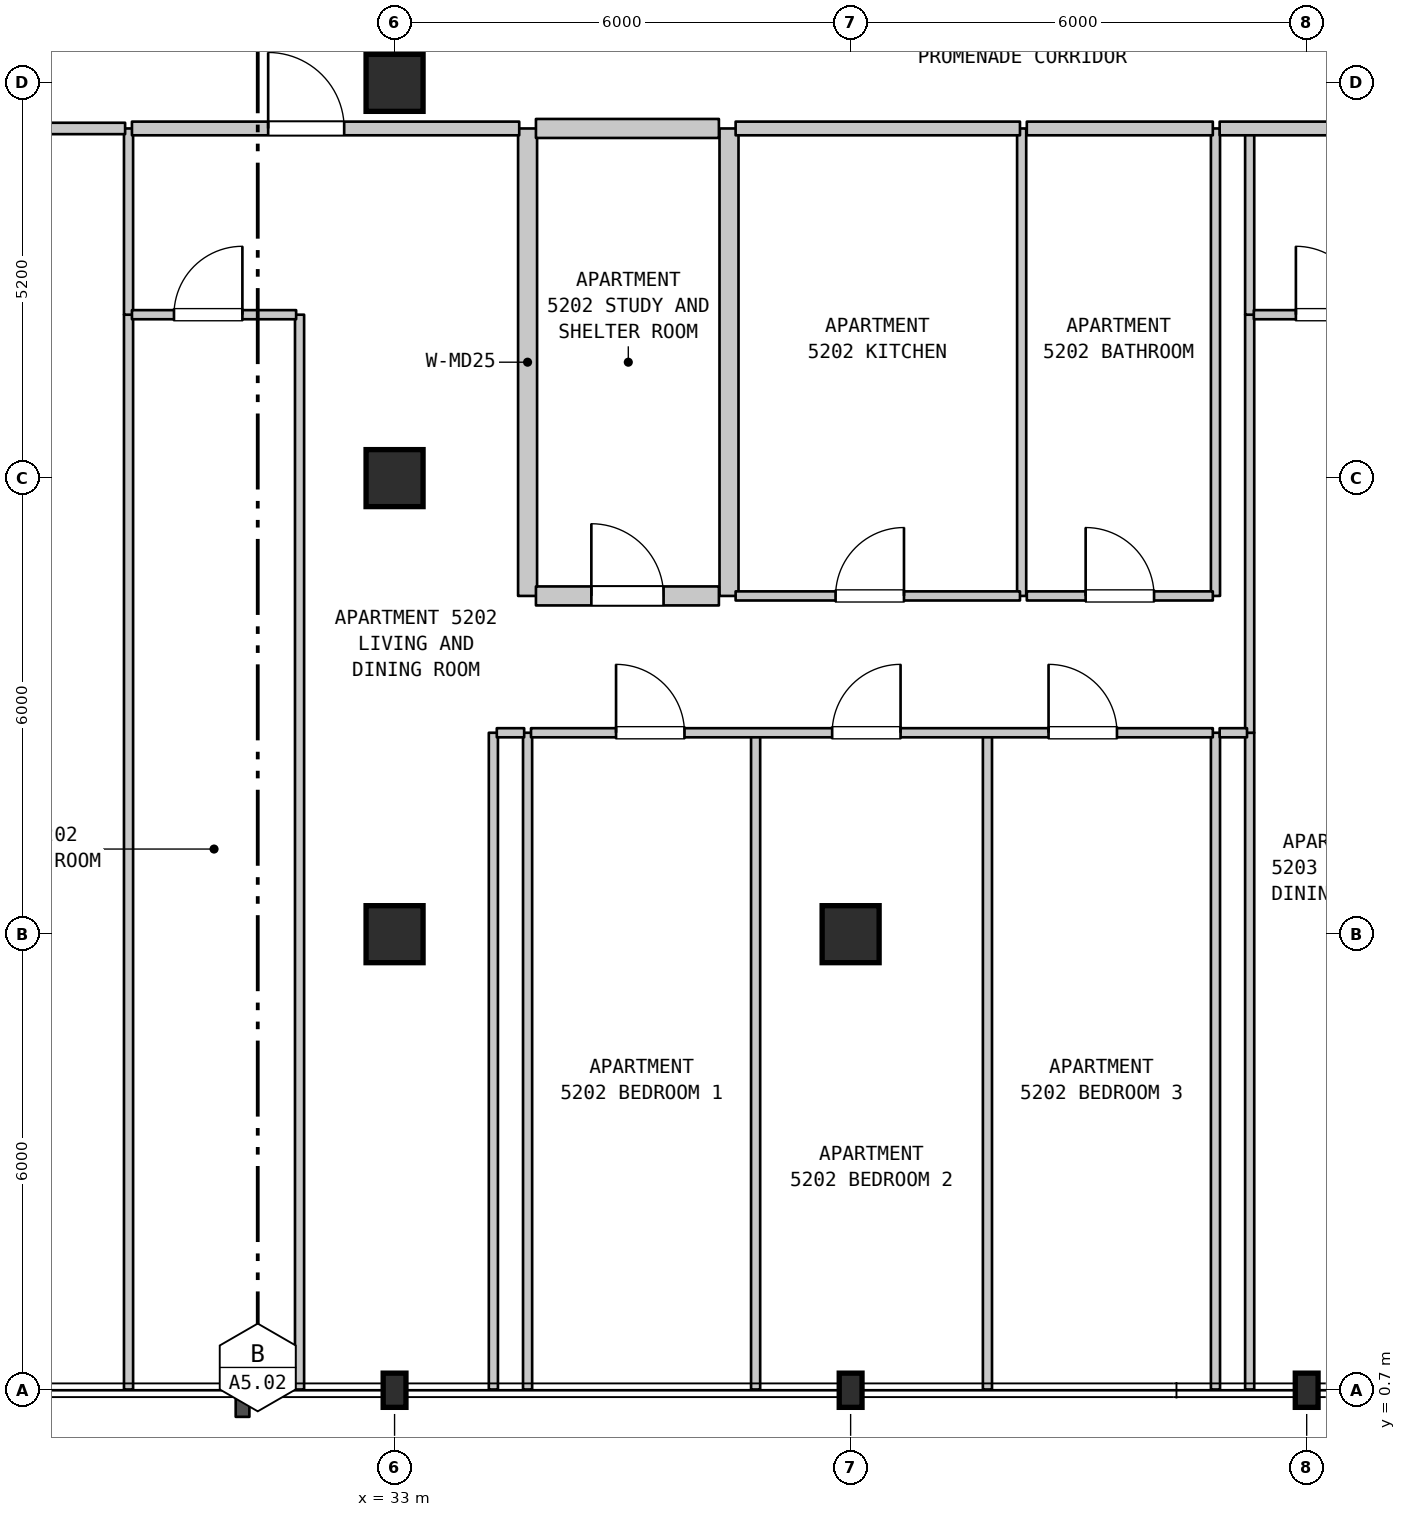
"""IFC4 building model, lengths in metres.
Left out: names, types, materials, properties, quantities, classifications, styles, units other than length and angle.
Written with IfcOpenShell. Run it as: python <this file> out.ifc"""

import sys

from ifc_helpers import new_model, si_unit, direction, frame, frame_2d, origin, origin_2d, place, context, subcontext, project, spatial, rectangle, i_section, extrude, element, fill, save


model = new_model("IFC4")
c1 = context("Model", 3, precision=1e-05, world=origin(), true_north=direction((0.0, 1.0)))
c2 = subcontext(c1, "Body", "Model", "MODEL_VIEW")
j1 = project(units=[si_unit("LENGTHUNIT", "METRE"), si_unit("PLANEANGLEUNIT", "RADIAN")], contexts=[c1])
p1 = place(None, origin())
s1 = spatial("IfcSite", under=j1, at=p1, CompositionType="ELEMENT")
p2 = place(p1, origin())
s2 = spatial("IfcBuilding", under=s1, at=p2, CompositionType="ELEMENT")
p3 = place(p2, frame((0.0, 0.0, 210.6)))
s3 = spatial("IfcBuildingStorey", under=s2, at=p3, CompositionType="ELEMENT", Elevation=210.6)
p4 = place(p3, frame((33.0, 0.7, 0.0), z_axis=(0.0, 0.0, 1.0), x_axis=(1.0, 0.0, 0.0)))
e1 = element("IfcColumn", 1, at=p4, inside=s3, PredefinedType="COLUMN", context=c2, shape_type="SweptSolid", body=[
    extrude(i_section(OverallWidth=0.3, OverallDepth=0.45, WebThickness=0.014, FlangeThickness=0.026, FilletRadius=0.027, at=origin_2d()), origin(), (0.0, 0.0, 1.0), 3.7),
])
for number, where, z_axis, x_axis in (
    (2, (33.0, 6.7, 0.0), (0.0, 0.0, 1.0), (1.0, 0.0, 0.0)),
    (3, (33.0, 12.7, 0.0), (0.0, 0.0, 1.0), (1.0, 0.0, 0.0)),
    (4, (33.0, 17.9, 0.0), (0.0, 0.0, 1.0), (1.0, 0.0, 0.0)),
):
    element("IfcColumn", number, at=place(p3, frame(where, z_axis=z_axis, x_axis=x_axis)), inside=s3, PredefinedType="COLUMN", context=c2, shape_type="SweptSolid", body=[
        extrude(rectangle(XDim=0.75, YDim=0.75, at=origin_2d()), origin(), (0.0, 0.0, 1.0), 3.7),
    ])
p5 = place(p3, frame((39.0, 0.7, 0.0), z_axis=(0.0, 0.0, 1.0), x_axis=(1.0, 0.0, 0.0)))
e5 = element("IfcColumn", 5, at=p5, inside=s3, PredefinedType="COLUMN", context=c2, shape_type="SweptSolid", body=[
    extrude(i_section(OverallWidth=0.3, OverallDepth=0.45, WebThickness=0.014, FlangeThickness=0.026, FilletRadius=0.027, at=origin_2d()), origin(), (0.0, 0.0, 1.0), 3.7),
])
p6 = place(p3, frame((39.0, 6.7, 0.0), z_axis=(0.0, 0.0, 1.0), x_axis=(1.0, 0.0, 0.0)))
e6 = element("IfcColumn", 6, at=p6, inside=s3, PredefinedType="COLUMN", context=c2, shape_type="SweptSolid", body=[
    extrude(rectangle(XDim=0.75, YDim=0.75, at=origin_2d()), origin(), (0.0, 0.0, 1.0), 3.7),
])
p7 = place(p3, frame((45.0, 0.7, 0.0), z_axis=(0.0, 0.0, 1.0), x_axis=(1.0, 0.0, 0.0)))
e7 = element("IfcColumn", 7, at=p7, inside=s3, PredefinedType="COLUMN", context=c2, shape_type="SweptSolid", body=[
    extrude(i_section(OverallWidth=0.3, OverallDepth=0.45, WebThickness=0.014, FlangeThickness=0.026, FilletRadius=0.027, at=origin_2d()), origin(), (0.0, 0.0, 1.0), 3.7),
])
p8 = place(p3, frame((29.5, 0.71, 0.0), z_axis=(0.0, 0.0, 1.0), x_axis=(0.0, 1.0, 0.0)))
e8 = element("IfcWall", 8, at=p8, inside=s3, PredefinedType="PARTITIONING", context=c2, shape_type="SweptSolid", body=[
    extrude(rectangle(XDim=14.14, YDim=0.12, at=frame_2d((7.07, 0.0))), origin(), (0.0, 0.0, 1.0), 3.39),
])
p9 = place(p3, frame((29.5, 14.85, 0.0), z_axis=(0.0, 0.0, 1.0), x_axis=(0.0, 1.0, 0.0)))
e9 = element("IfcWall", 9, at=p9, inside=s3, PredefinedType="PARTITIONING", context=c2, shape_type="SweptSolid", body=[
    extrude(rectangle(XDim=2.45, YDim=0.12, at=frame_2d((1.225, 0.0))), origin(), (0.0, 0.0, 1.0), 3.39),
])
p10 = place(p3, frame((31.75, 0.71, 0.0), z_axis=(0.0, 0.0, 1.0), x_axis=(0.0, 1.0, 0.0)))
e10 = element("IfcWall", 10, at=p10, inside=s3, PredefinedType="PARTITIONING", context=c2, shape_type="SweptSolid", body=[
    extrude(rectangle(XDim=14.14, YDim=0.12, at=frame_2d((7.07, 0.0))), origin(), (0.0, 0.0, 1.0), 3.39),
])
for number, where, z_axis, x_axis in (
    (11, (34.3, 0.71, 0.0), (0.0, 0.0, 1.0), (0.0, 1.0, 0.0)),
    (12, (34.75, 0.71, 0.0), (0.0, 0.0, 1.0), (0.0, 1.0, 0.0)),
):
    element("IfcWall", number, at=place(p3, frame(where, z_axis=z_axis, x_axis=x_axis)), inside=s3, PredefinedType="PARTITIONING", context=c2, shape_type="SweptSolid", body=[
        extrude(rectangle(XDim=8.64, YDim=0.12, at=frame_2d((4.32, 0.0))), origin(), (0.0, 0.0, 1.0), 3.39),
    ])
for number, where, z_axis, x_axis in (
    (13, (34.75, 11.15, 0.0), (0.0, 0.0, 1.0), (0.0, 1.0, 0.0)),
    (14, (37.4, 11.15, 0.0), (0.0, 0.0, 1.0), (0.0, 1.0, 0.0)),
):
    element("IfcWall", number, at=place(p3, frame(where, z_axis=z_axis, x_axis=x_axis)), inside=s3, PredefinedType="STANDARD", context=c2, shape_type="SweptSolid", body=[
        extrude(rectangle(XDim=6.15, YDim=0.25, at=frame_2d((3.075, 0.0))), origin(), (0.0, 0.0, 1.0), 3.39),
    ])
for number, where, z_axis, x_axis in (
    (15, (37.75, 0.71, 0.0), (0.0, 0.0, 1.0), (0.0, 1.0, 0.0)),
    (16, (40.8, 0.71, 0.0), (0.0, 0.0, 1.0), (0.0, 1.0, 0.0)),
):
    element("IfcWall", number, at=place(p3, frame(where, z_axis=z_axis, x_axis=x_axis)), inside=s3, PredefinedType="PARTITIONING", context=c2, shape_type="SweptSolid", body=[
        extrude(rectangle(XDim=8.64, YDim=0.12, at=frame_2d((4.32, 0.0))), origin(), (0.0, 0.0, 1.0), 3.39),
    ])
p11 = place(p3, frame((41.25, 11.15, 0.0), z_axis=(0.0, 0.0, 1.0), x_axis=(0.0, 1.0, 0.0)))
e17 = element("IfcWall", 17, at=p11, inside=s3, PredefinedType="PARTITIONING", context=c2, shape_type="SweptSolid", body=[
    extrude(rectangle(XDim=6.15, YDim=0.12, at=frame_2d((3.075, 0.0))), origin(), (0.0, 0.0, 1.0), 3.39),
])
p12 = place(p3, frame((43.8, 0.71, 0.0), z_axis=(0.0, 0.0, 1.0), x_axis=(0.0, 1.0, 0.0)))
e18 = element("IfcWall", 18, at=p12, inside=s3, PredefinedType="PARTITIONING", context=c2, shape_type="SweptSolid", body=[
    extrude(rectangle(XDim=8.64, YDim=0.12, at=frame_2d((4.32, 0.0))), origin(), (0.0, 0.0, 1.0), 3.39),
])
p13 = place(p3, frame((43.8, 11.15, 0.0), z_axis=(0.0, 0.0, 1.0), x_axis=(0.0, 1.0, 0.0)))
e19 = element("IfcWall", 19, at=p13, inside=s3, PredefinedType="PARTITIONING", context=c2, shape_type="SweptSolid", body=[
    extrude(rectangle(XDim=6.15, YDim=0.12, at=frame_2d((3.075, 0.0))), origin(), (0.0, 0.0, 1.0), 3.39),
])
p14 = place(p3, frame((44.25, 0.71, 0.0), z_axis=(0.0, 0.0, 1.0), x_axis=(0.0, 1.0, 0.0)))
e20 = element("IfcWall", 20, at=p14, inside=s3, PredefinedType="PARTITIONING", context=c2, shape_type="SweptSolid", body=[
    extrude(rectangle(XDim=8.64, YDim=0.12, at=frame_2d((4.32, 0.0))), origin(), (0.0, 0.0, 1.0), 3.39),
])
p15 = place(p3, frame((44.25, 9.35, 0.0), z_axis=(0.0, 0.0, 1.0), x_axis=(0.0, 1.0, 0.0)))
e21 = element("IfcWall", 21, at=p15, inside=s3, PredefinedType="PARTITIONING", context=c2, shape_type="SweptSolid", body=[
    extrude(rectangle(XDim=5.5, YDim=0.12, at=frame_2d((2.75, 0.0))), origin(), (0.0, 0.0, 1.0), 3.39),
])
p16 = place(p3, frame((44.25, 14.85, 0.0), z_axis=(0.0, 0.0, 1.0), x_axis=(0.0, 1.0, 0.0)))
e22 = element("IfcWall", 22, at=p16, inside=s3, PredefinedType="PARTITIONING", context=c2, shape_type="SweptSolid", body=[
    extrude(rectangle(XDim=2.45, YDim=0.12, at=frame_2d((1.225, 0.0))), origin(), (0.0, 0.0, 1.0), 3.39),
])
p17 = place(p3, frame((34.345, 9.35, 0.0), z_axis=(0.0, 0.0, 1.0), x_axis=(1.0, 0.0, 0.0)))
e23 = element("IfcWall", 23, at=p17, inside=s3, PredefinedType="PARTITIONING", context=c2, shape_type="SweptSolid", body=[
    extrude(rectangle(XDim=0.36, YDim=0.12, at=frame_2d((0.18, 0.0))), origin(), (0.0, 0.0, 1.0), 3.39),
])
p18 = place(p3, frame((34.795, 9.35, 0.0), z_axis=(0.0, 0.0, 1.0), x_axis=(1.0, 0.0, 0.0)))
e24 = element("IfcWall", 24, at=p18, inside=s3, PredefinedType="PARTITIONING", context=c2, shape_type="SweptSolid", body=[
    extrude(rectangle(XDim=8.97, YDim=0.12, at=frame_2d((4.485, 0.0))), origin(), (0.0, 0.0, 1.0), 3.39),
])
p19 = place(p18, frame((1.119, 0.0, 0.0)))
e25 = element("IfcOpeningElement", 25, at=p19, cuts=e24, PredefinedType="OPENING", context=c2, shape_type="SweptSolid", body=[
    extrude(rectangle(XDim=0.9, YDim=2.15, at=frame_2d((0.45, 1.075))), frame((0.0, 0.07, 0.0), z_axis=(0.0, -1.0, 0.0), x_axis=(1.0, 0.0, 0.0)), (0.0, 0.0, 1.0), 0.14),
])
p20 = place(p18, frame((3.962, 0.0, 0.0)))
e26 = element("IfcOpeningElement", 26, at=p20, cuts=e24, PredefinedType="OPENING", context=c2, shape_type="SweptSolid", body=[
    extrude(rectangle(XDim=0.9, YDim=2.15, at=frame_2d((0.45, 1.075))), frame((0.0, 0.07, 0.0), z_axis=(0.0, -1.0, 0.0), x_axis=(1.0, 0.0, 0.0)), (0.0, 0.0, 1.0), 0.14),
])
p21 = place(p18, frame((6.809, 0.0, 0.0)))
e27 = element("IfcOpeningElement", 27, at=p21, cuts=e24, PredefinedType="OPENING", context=c2, shape_type="SweptSolid", body=[
    extrude(rectangle(XDim=0.9, YDim=2.15, at=frame_2d((0.45, 1.075))), frame((0.0, 0.07, 0.0), z_axis=(0.0, -1.0, 0.0), x_axis=(1.0, 0.0, 0.0)), (0.0, 0.0, 1.0), 0.14),
])
p22 = place(p3, frame((43.855, 9.35, 0.0), z_axis=(0.0, 0.0, 1.0), x_axis=(1.0, 0.0, 0.0)))
e28 = element("IfcWall", 28, at=p22, inside=s3, PredefinedType="PARTITIONING", context=c2, shape_type="SweptSolid", body=[
    extrude(rectangle(XDim=0.36, YDim=0.12, at=frame_2d((0.18, 0.0))), origin(), (0.0, 0.0, 1.0), 3.39),
])
p23 = place(p3, frame((34.86, 11.15, 0.0), z_axis=(0.0, 0.0, 1.0), x_axis=(1.0, 0.0, 0.0)))
e29 = element("IfcWall", 29, at=p23, inside=s3, PredefinedType="STANDARD", context=c2, shape_type="SweptSolid", body=[
    extrude(rectangle(XDim=2.407, YDim=0.25, at=frame_2d((1.204, 0.0))), origin(), (0.0, 0.0, 1.0), 3.39),
])
p24 = place(p23, frame((0.729, 0.0, 0.0)))
e30 = element("IfcOpeningElement", 30, at=p24, cuts=e29, PredefinedType="OPENING", context=c2, shape_type="SweptSolid", body=[
    extrude(rectangle(XDim=0.95, YDim=2.15, at=frame_2d((0.475, 1.075))), frame((0.0, 0.135, 0.0), z_axis=(0.0, -1.0, 0.0), x_axis=(1.0, 0.0, 0.0)), (0.0, 0.0, 1.0), 0.27),
])
p25 = place(p3, frame((37.487, 11.15, 0.0), z_axis=(0.0, 0.0, 1.0), x_axis=(1.0, 0.0, 0.0)))
e31 = element("IfcWall", 31, at=p25, inside=s3, PredefinedType="PARTITIONING", context=c2, shape_type="SweptSolid", body=[
    extrude(rectangle(XDim=3.741, YDim=0.12, at=frame_2d((1.871, 0.0))), origin(), (0.0, 0.0, 1.0), 3.39),
])
p26 = place(p25, frame((1.315, 0.0, 0.0)))
e32 = element("IfcOpeningElement", 32, at=p26, cuts=e31, PredefinedType="OPENING", context=c2, shape_type="SweptSolid", body=[
    extrude(rectangle(XDim=0.9, YDim=2.15, at=frame_2d((0.45, 1.075))), frame((0.0, 0.07, 0.0), z_axis=(0.0, -1.0, 0.0), x_axis=(1.0, 0.0, 0.0)), (0.0, 0.0, 1.0), 0.14),
])
p27 = place(p3, frame((41.318, 11.15, 0.0), z_axis=(0.0, 0.0, 1.0), x_axis=(1.0, 0.0, 0.0)))
e33 = element("IfcWall", 33, at=p27, inside=s3, PredefinedType="PARTITIONING", context=c2, shape_type="SweptSolid", body=[
    extrude(rectangle(XDim=2.447, YDim=0.12, at=frame_2d((1.223, 0.0))), origin(), (0.0, 0.0, 1.0), 3.39),
])
p28 = place(p27, frame((0.774, 0.0, 0.0)))
e34 = element("IfcOpeningElement", 34, at=p28, cuts=e33, PredefinedType="OPENING", context=c2, shape_type="SweptSolid", body=[
    extrude(rectangle(XDim=0.9, YDim=2.1, at=frame_2d((0.45, 1.05))), frame((0.0, 0.07, 0.0), z_axis=(0.0, -1.0, 0.0), x_axis=(1.0, 0.0, 0.0)), (0.0, 0.0, 1.0), 0.14),
])
p29 = place(p3, frame((29.545, 14.85, 0.0), z_axis=(0.0, 0.0, 1.0), x_axis=(1.0, 0.0, 0.0)))
e35 = element("IfcWall", 35, at=p29, inside=s3, PredefinedType="PARTITIONING", context=c2, shape_type="SweptSolid", body=[
    extrude(rectangle(XDim=2.16, YDim=0.12, at=frame_2d((1.08, 0.0))), origin(), (0.0, 0.0, 1.0), 3.39),
])
p30 = place(p29, frame((0.553, 0.0, 0.0)))
e36 = element("IfcOpeningElement", 36, at=p30, cuts=e35, PredefinedType="OPENING", context=c2, shape_type="SweptSolid", body=[
    extrude(rectangle(XDim=0.9, YDim=2.15, at=frame_2d((0.45, 1.075))), frame((0.0, 0.07, 0.0), z_axis=(0.0, -1.0, 0.0), x_axis=(1.0, 0.0, 0.0)), (0.0, 0.0, 1.0), 0.14),
])
p31 = place(p3, frame((44.305, 14.85, 0.0), z_axis=(0.0, 0.0, 1.0), x_axis=(1.0, 0.0, 0.0)))
e37 = element("IfcWall", 37, at=p31, inside=s3, PredefinedType="PARTITIONING", context=c2, shape_type="SweptSolid", body=[
    extrude(rectangle(XDim=2.16, YDim=0.12, at=frame_2d((1.08, 0.0))), origin(), (0.0, 0.0, 1.0), 3.39),
])
p32 = place(p31, frame((0.553, 0.0, 0.0)))
e38 = element("IfcOpeningElement", 38, at=p32, cuts=e37, PredefinedType="OPENING", context=c2, shape_type="SweptSolid", body=[
    extrude(rectangle(XDim=0.9, YDim=2.15, at=frame_2d((0.45, 1.075))), frame((0.0, 0.07, 0.0), z_axis=(0.0, -1.0, 0.0), x_axis=(1.0, 0.0, 0.0)), (0.0, 0.0, 1.0), 0.14),
])
p33 = place(p3, frame((24.845, 17.3, 0.0), z_axis=(0.0, 0.0, 1.0), x_axis=(1.0, 0.0, 0.0)))
e39 = element("IfcWall", 39, at=p33, inside=s3, PredefinedType="STANDARD", context=c2, shape_type="SweptSolid", body=[
    extrude(rectangle(XDim=4.61, YDim=0.15, at=frame_2d((2.305, 0.0))), origin(), (0.0, 0.0, 1.0), 3.39),
])
p34 = place(p33, frame((1.734, 0.0, 0.0)))
e40 = element("IfcOpeningElement", 40, at=p34, cuts=e39, PredefinedType="OPENING", context=c2, shape_type="SweptSolid", body=[
    extrude(rectangle(XDim=1.0, YDim=2.15, at=frame_2d((0.5, 1.075))), frame((0.0, 0.085, 0.0), z_axis=(0.0, -1.0, 0.0), x_axis=(1.0, 0.0, 0.0)), (0.0, 0.0, 1.0), 0.17),
])
p35 = place(p3, frame((29.545, 17.3, 0.0), z_axis=(0.0, 0.0, 1.0), x_axis=(1.0, 0.0, 0.0)))
e41 = element("IfcWall", 41, at=p35, inside=s3, PredefinedType="STANDARD", context=c2, shape_type="SweptSolid", body=[
    extrude(rectangle(XDim=5.095, YDim=0.18, at=frame_2d((2.547, 0.0))), origin(), (0.0, 0.0, 1.0), 3.39),
])
p36 = place(p35, frame((1.792, 0.0, 0.0)))
e42 = element("IfcOpeningElement", 42, at=p36, cuts=e41, PredefinedType="OPENING", context=c2, shape_type="SweptSolid", body=[
    extrude(rectangle(XDim=1.0, YDim=2.15, at=frame_2d((0.5, 1.075))), frame((0.0, 0.1, 0.0), z_axis=(0.0, -1.0, 0.0), x_axis=(1.0, 0.0, 0.0)), (0.0, 0.0, 1.0), 0.2),
])
p37 = place(p3, frame((34.86, 17.3, 0.0), z_axis=(0.0, 0.0, 1.0), x_axis=(1.0, 0.0, 0.0)))
e43 = element("IfcWall", 43, at=p37, inside=s3, PredefinedType="STANDARD", context=c2, shape_type="SweptSolid", body=[
    extrude(rectangle(XDim=2.407, YDim=0.25, at=frame_2d((1.204, 0.0))), origin(), (0.0, 0.0, 1.0), 3.39),
])
p38 = place(p3, frame((37.487, 17.3, 0.0), z_axis=(0.0, 0.0, 1.0), x_axis=(1.0, 0.0, 0.0)))
e44 = element("IfcWall", 44, at=p38, inside=s3, PredefinedType="STANDARD", context=c2, shape_type="SweptSolid", body=[
    extrude(rectangle(XDim=3.741, YDim=0.18, at=frame_2d((1.871, 0.0))), origin(), (0.0, 0.0, 1.0), 3.39),
])
p39 = place(p3, frame((41.318, 17.3, 0.0), z_axis=(0.0, 0.0, 1.0), x_axis=(1.0, 0.0, 0.0)))
e45 = element("IfcWall", 45, at=p39, inside=s3, PredefinedType="STANDARD", context=c2, shape_type="SweptSolid", body=[
    extrude(rectangle(XDim=2.447, YDim=0.18, at=frame_2d((1.223, 0.0))), origin(), (0.0, 0.0, 1.0), 3.39),
])
p40 = place(p3, frame((43.855, 17.3, 0.0), z_axis=(0.0, 0.0, 1.0), x_axis=(1.0, 0.0, 0.0)))
e46 = element("IfcWall", 46, at=p40, inside=s3, PredefinedType="STANDARD", context=c2, shape_type="SweptSolid", body=[
    extrude(rectangle(XDim=5.21, YDim=0.18, at=frame_2d((2.605, 0.0))), origin(), (0.0, 0.0, 1.0), 3.39),
])
p41 = place(p40, frame((2.305, 0.0, 0.0)))
e47 = element("IfcOpeningElement", 47, at=p41, cuts=e46, PredefinedType="OPENING", context=c2, shape_type="SweptSolid", body=[
    extrude(rectangle(XDim=1.0, YDim=2.15, at=frame_2d((0.5, 1.075))), frame((0.0, 0.1, 0.0), z_axis=(0.0, -1.0, 0.0), x_axis=(1.0, 0.0, 0.0)), (0.0, 0.0, 1.0), 0.2),
])
p42 = place(p19, origin())
e48 = element("IfcDoor", 48, at=p42, inside=s3, OperationType="SINGLE_SWING_LEFT", PredefinedType="DOOR", context=c2, shape_type="SweptSolid", body=[
    extrude(rectangle(XDim=0.9, YDim=2.15, at=frame_2d((0.45, 1.075))), frame((0.0, 0.025, 0.0), z_axis=(0.0, -1.0, 0.0), x_axis=(1.0, 0.0, 0.0)), (0.0, 0.0, 1.0), 0.05),
])
fill(e25, e48)
p43 = place(p20, origin())
e49 = element("IfcDoor", 49, at=p43, inside=s3, OperationType="SINGLE_SWING_RIGHT", PredefinedType="DOOR", context=c2, shape_type="SweptSolid", body=[
    extrude(rectangle(XDim=0.9, YDim=2.15, at=frame_2d((0.45, 1.075))), frame((0.0, 0.025, 0.0), z_axis=(0.0, -1.0, 0.0), x_axis=(1.0, 0.0, 0.0)), (0.0, 0.0, 1.0), 0.05),
])
fill(e26, e49)
p44 = place(p21, origin())
e50 = element("IfcDoor", 50, at=p44, inside=s3, OperationType="SINGLE_SWING_LEFT", PredefinedType="DOOR", context=c2, shape_type="SweptSolid", body=[
    extrude(rectangle(XDim=0.9, YDim=2.15, at=frame_2d((0.45, 1.075))), frame((0.0, 0.025, 0.0), z_axis=(0.0, -1.0, 0.0), x_axis=(1.0, 0.0, 0.0)), (0.0, 0.0, 1.0), 0.05),
])
fill(e27, e50)
p45 = place(p24, origin())
e51 = element("IfcDoor", 51, at=p45, inside=s3, OperationType="SINGLE_SWING_LEFT", PredefinedType="DOOR", context=c2, shape_type="SweptSolid", body=[
    extrude(rectangle(XDim=0.95, YDim=2.15, at=frame_2d((0.475, 1.075))), frame((0.0, 0.025, 0.0), z_axis=(0.0, -1.0, 0.0), x_axis=(1.0, 0.0, 0.0)), (0.0, 0.0, 1.0), 0.05),
])
fill(e30, e51)
p46 = place(p26, origin())
e52 = element("IfcDoor", 52, at=p46, inside=s3, OperationType="SINGLE_SWING_RIGHT", PredefinedType="DOOR", context=c2, shape_type="SweptSolid", body=[
    extrude(rectangle(XDim=0.9, YDim=2.15, at=frame_2d((0.45, 1.075))), frame((0.0, 0.025, 0.0), z_axis=(0.0, -1.0, 0.0), x_axis=(1.0, 0.0, 0.0)), (0.0, 0.0, 1.0), 0.05),
])
fill(e32, e52)
p47 = place(p28, origin())
e53 = element("IfcDoor", 53, at=p47, inside=s3, OperationType="SINGLE_SWING_LEFT", PredefinedType="DOOR", context=c2, shape_type="SweptSolid", body=[
    extrude(rectangle(XDim=0.9, YDim=2.1, at=frame_2d((0.45, 1.05))), frame((0.0, 0.025, 0.0), z_axis=(0.0, -1.0, 0.0), x_axis=(1.0, 0.0, 0.0)), (0.0, 0.0, 1.0), 0.05),
])
fill(e34, e53)
p48 = place(p30, origin())
e54 = element("IfcDoor", 54, at=p48, inside=s3, OperationType="SINGLE_SWING_RIGHT", PredefinedType="DOOR", context=c2, shape_type="SweptSolid", body=[
    extrude(rectangle(XDim=0.9, YDim=2.15, at=frame_2d((0.45, 1.075))), frame((0.0, 0.025, 0.0), z_axis=(0.0, -1.0, 0.0), x_axis=(1.0, 0.0, 0.0)), (0.0, 0.0, 1.0), 0.05),
])
fill(e36, e54)
p49 = place(p32, origin())
e55 = element("IfcDoor", 55, at=p49, inside=s3, OperationType="SINGLE_SWING_LEFT", PredefinedType="DOOR", context=c2, shape_type="SweptSolid", body=[
    extrude(rectangle(XDim=0.9, YDim=2.15, at=frame_2d((0.45, 1.075))), frame((0.0, 0.025, 0.0), z_axis=(0.0, -1.0, 0.0), x_axis=(1.0, 0.0, 0.0)), (0.0, 0.0, 1.0), 0.05),
])
fill(e38, e55)
p50 = place(p36, origin())
e56 = element("IfcDoor", 56, at=p50, inside=s3, OperationType="SINGLE_SWING_LEFT", PredefinedType="DOOR", context=c2, shape_type="SweptSolid", body=[
    extrude(rectangle(XDim=1.0, YDim=2.15, at=frame_2d((0.5, 1.075))), frame((0.0, 0.025, 0.0), z_axis=(0.0, -1.0, 0.0), x_axis=(1.0, 0.0, 0.0)), (0.0, 0.0, 1.0), 0.05),
])
fill(e42, e56)
save(model, sys.argv[1])
